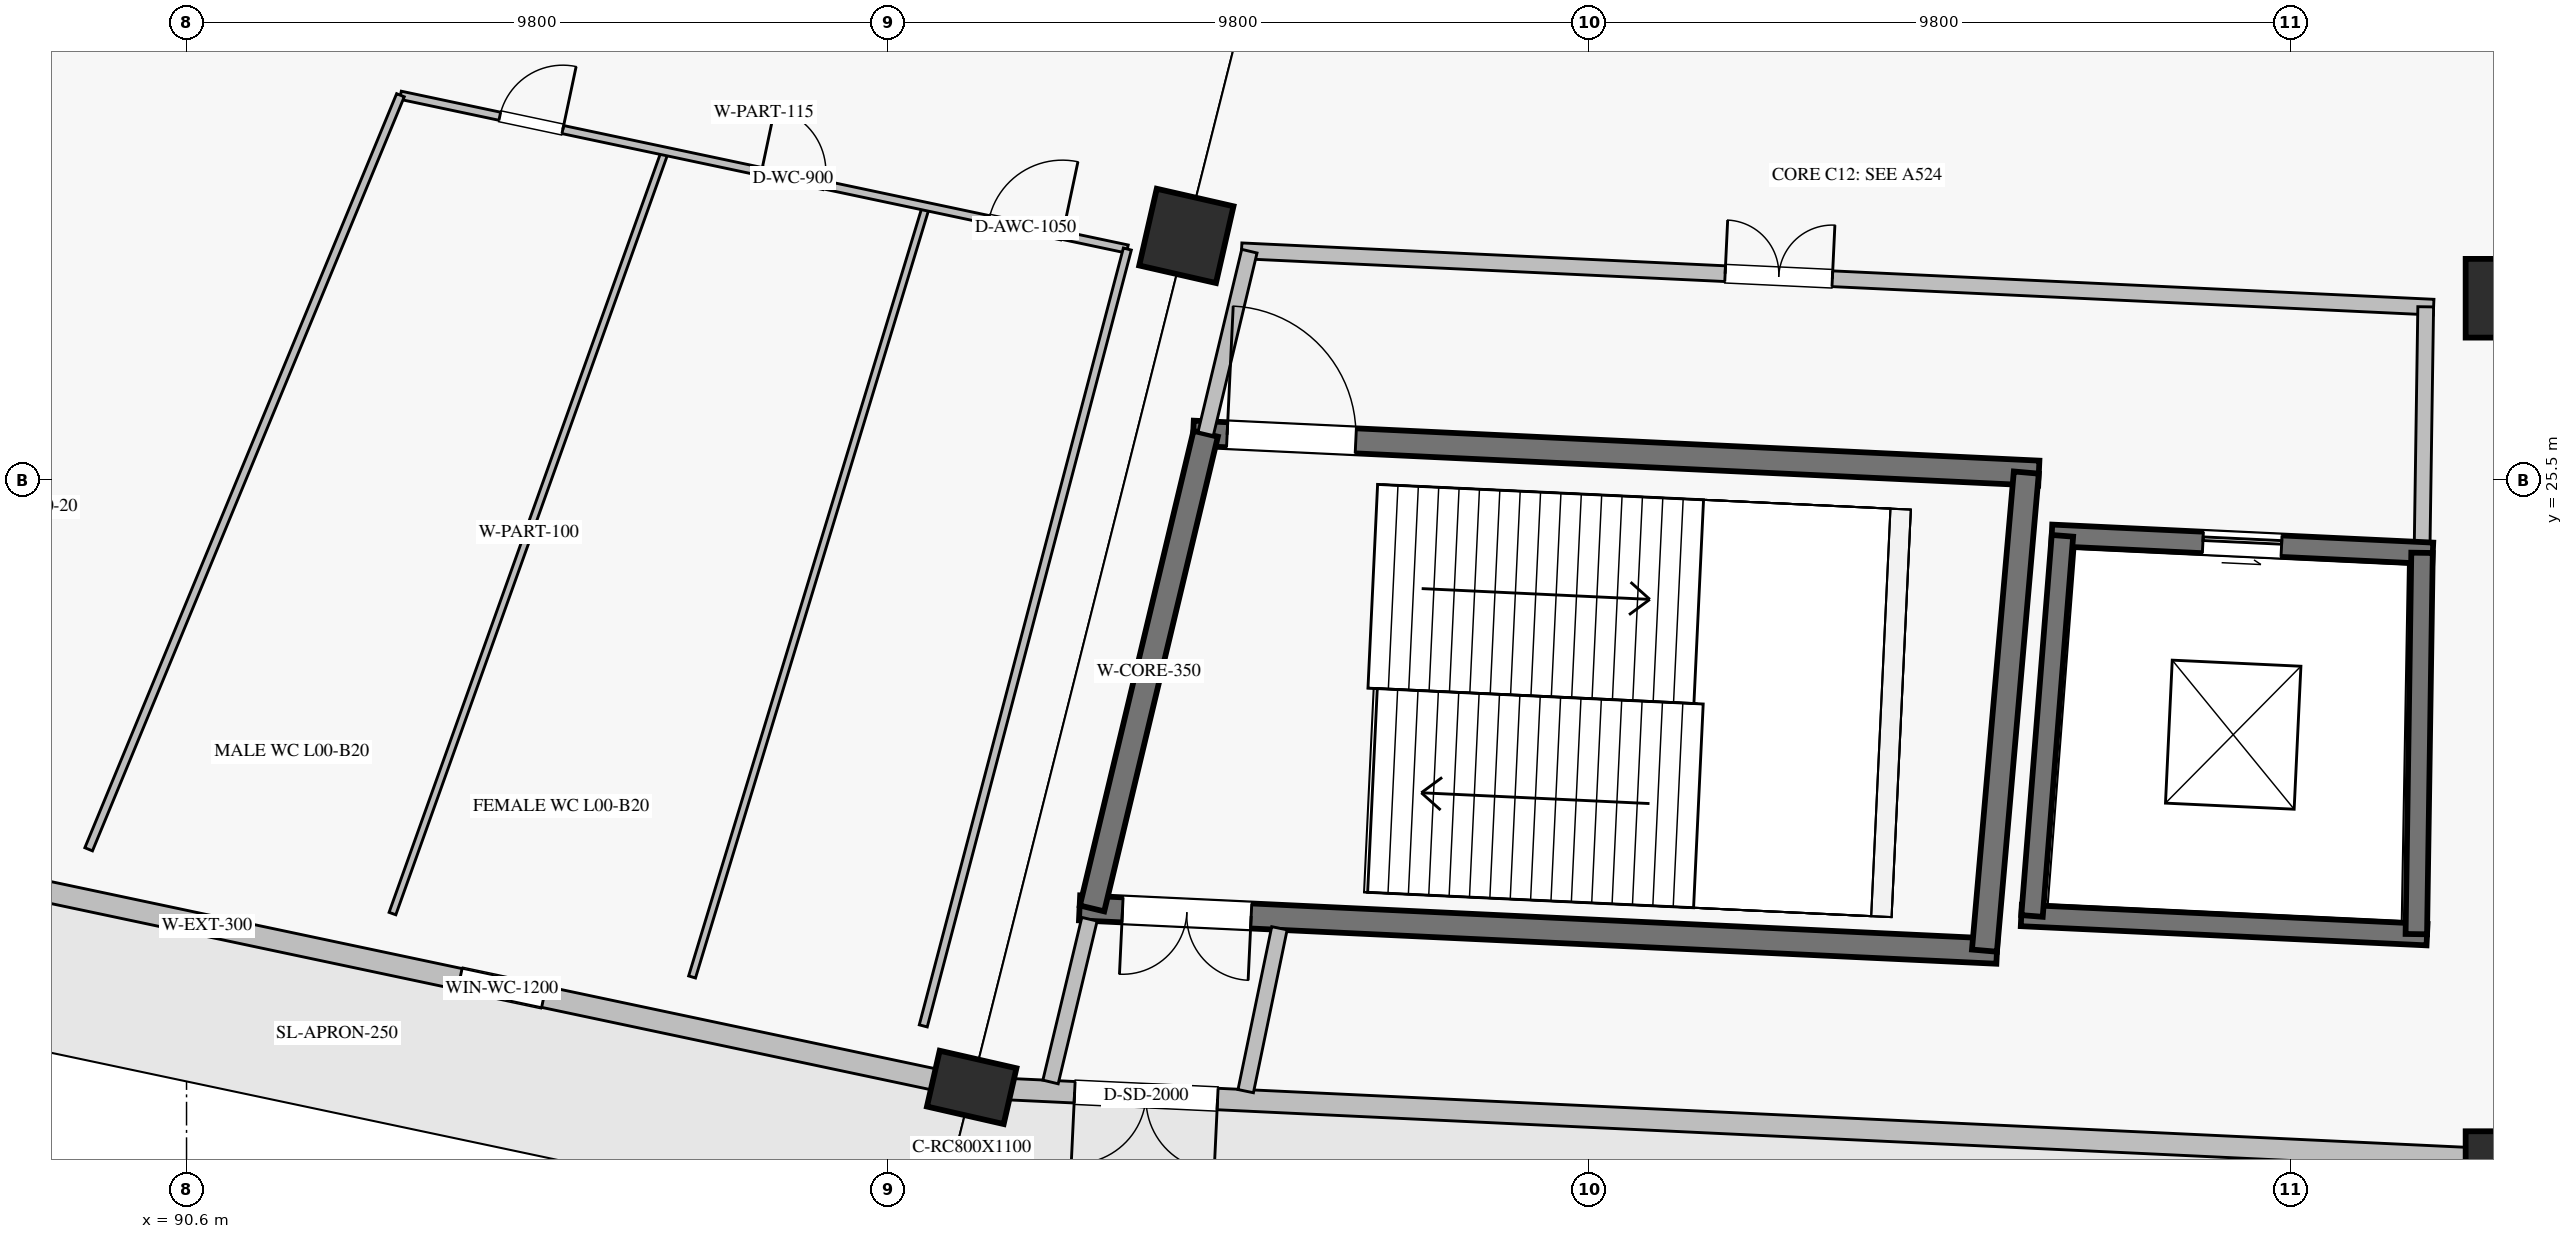
"""IFC4 building model, lengths in metres.
Left out: names, types, materials, properties, quantities, classifications, styles, units other than length and angle.
Written with IfcOpenShell. Run it as: python <this file> out.ifc"""

import sys

from ifc_helpers import new_model, si_unit, direction, frame, frame_2d, origin, origin_2d, place, context, subcontext, project, spatial, rectangle, extrude, element, fill, save


model = new_model("IFC4")
c1 = context("Model", 3, precision=1e-05, world=origin(), true_north=direction((0.0, 1.0)))
c2 = subcontext(c1, "Body", "Model", "MODEL_VIEW")
j1 = project(units=[si_unit("LENGTHUNIT", "METRE"), si_unit("PLANEANGLEUNIT", "RADIAN")], contexts=[c1])
p1 = place(None, origin())
s1 = spatial("IfcSite", under=j1, at=p1, CompositionType="ELEMENT")
p2 = place(p1, origin())
s2 = spatial("IfcBuilding", under=s1, at=p2, CompositionType="ELEMENT")
p3 = place(p2, origin())
s3 = spatial("IfcBuildingStorey", under=s2, at=p3, CompositionType="ELEMENT", Elevation=0.0)
for number, where, z_axis, x_axis in (
    (1, (104.572, 28.911, 0.0), (0.0, 0.0, 1.0), (-0.223, -0.975, 0.0)),
    (2, (123.0, 28.04, 0.0), (0.0, 0.0, 1.0), (0.0, -1.0, 0.0)),
):
    element("IfcColumn", number, at=place(p3, frame(where, z_axis=z_axis, x_axis=x_axis)), inside=s3, PredefinedType="COLUMN", context=c2, shape_type="SweptSolid", body=[
        extrude(rectangle(XDim=1.1, YDim=1.1, at=origin_2d()), origin(), (0.0, 0.0, 1.0), 5.78),
    ])
for number, where, z_axis, x_axis in (
    (3, (101.572, 17.013, 0.0), (0.0, 0.0, 1.0), (-0.223, -0.975, 0.0)),
    (4, (123.0, 16.0, 0.0), (0.0, 0.0, 1.0), (0.0, -1.0, 0.0)),
):
    element("IfcColumn", number, at=place(p3, frame(where, z_axis=z_axis, x_axis=x_axis)), inside=s3, PredefinedType="COLUMN", context=c2, shape_type="SweptSolid", body=[
        extrude(rectangle(XDim=0.8, YDim=1.1, at=origin_2d()), origin(), (0.0, 0.0, 1.0), 5.78),
    ])
p4 = place(p3, frame((80.577, 21.455, 0.0), z_axis=(0.0, 0.0, 1.0), x_axis=(0.978345100851, -0.206980346028, 0.0)))
e5 = element("IfcWall", 5, at=p4, inside=s3, PredefinedType="SOLIDWALL", context=c2, shape_type="SweptSolid", body=[
    extrude(rectangle(XDim=21.07, YDim=0.3, at=frame_2d((10.535, 0.0))), origin(), (0.0, 0.0, 1.0), 4.8),
])
p5 = place(p4, frame((2.493, 0.0, 0.0)))
e6 = element("IfcOpeningElement", 6, at=p5, cuts=e5, PredefinedType="OPENING", context=c2, shape_type="SweptSolid", body=[
    extrude(rectangle(XDim=2.6, YDim=2.4, at=frame_2d((1.3, 1.2))), frame((0.0, 0.16, 0.0), z_axis=(0.0, -1.0, 0.0), x_axis=(1.0, 0.0, 0.0)), (0.0, 0.0, 1.0), 0.32),
])
p6 = place(p4, frame((14.149, 0.0, 1.65)))
e7 = element("IfcOpeningElement", 7, at=p6, cuts=e5, PredefinedType="OPENING", context=c2, shape_type="SweptSolid", body=[
    extrude(rectangle(XDim=1.2, YDim=0.9, at=frame_2d((0.6, 0.45))), frame((0.0, 0.16, 0.0), z_axis=(0.0, -1.0, 0.0), x_axis=(1.0, 0.0, 0.0)), (0.0, 0.0, 1.0), 0.32),
])
p7 = place(p3, frame((101.962, 16.995, 0.0), z_axis=(0.0, 0.0, 1.0), x_axis=(0.998884033728, -0.047230150999, 0.0)))
e8 = element("IfcWall", 8, at=p7, inside=s3, PredefinedType="SOLIDWALL", context=c2, shape_type="SweptSolid", body=[
    extrude(rectangle(XDim=20.671, YDim=0.3, at=frame_2d((10.336, 0.0))), origin(), (0.0, 0.0, 1.0), 4.8),
])
p8 = place(p7, frame((1.05, 0.0, 0.0)))
e9 = element("IfcOpeningElement", 9, at=p8, cuts=e8, PredefinedType="OPENING", context=c2, shape_type="SweptSolid", body=[
    extrude(rectangle(XDim=2.0, YDim=2.3, at=frame_2d((1.0, 1.15))), frame((0.0, 0.16, 0.0), z_axis=(0.0, -1.0, 0.0), x_axis=(1.0, 0.0, 0.0)), (0.0, 0.0, 1.0), 0.32),
])
p9 = place(p3, frame((104.667, 26.155, 0.0), z_axis=(0.0, 0.0, 1.0), x_axis=(0.998883770468, -0.04723571843, 0.0)))
e10 = element("IfcWall", 10, at=p9, inside=s3, PredefinedType="SHEAR", context=c2, shape_type="SweptSolid", body=[
    extrude(rectangle(XDim=11.831, YDim=0.35, at=frame_2d((5.916, 0.0))), origin(), (0.0, 0.0, 1.0), 5.5),
])
p10 = place(p9, frame((0.475, 0.0, 0.0)))
e11 = element("IfcOpeningElement", 11, at=p10, cuts=e10, PredefinedType="OPENING", context=c2, shape_type="SweptSolid", body=[
    extrude(rectangle(XDim=1.8, YDim=2.2, at=frame_2d((0.9, 1.1))), frame((0.0, 0.185, 0.0), z_axis=(0.0, -1.0, 0.0), x_axis=(1.0, 0.0, 0.0)), (0.0, 0.0, 1.0), 0.37),
])
p11 = place(p3, frame((103.08, 19.522, 0.0), z_axis=(0.0, 0.0, 1.0), x_axis=(0.998884004857, -0.047230761603, 0.0)))
e12 = element("IfcWall", 12, at=p11, inside=s3, PredefinedType="SHEAR", context=c2, shape_type="SweptSolid", body=[
    extrude(rectangle(XDim=12.835, YDim=0.35, at=frame_2d((6.417, 0.0))), origin(), (0.0, 0.0, 1.0), 5.5),
])
p12 = place(p11, frame((0.601, 0.0, 0.0)))
e13 = element("IfcOpeningElement", 13, at=p12, cuts=e12, PredefinedType="OPENING", context=c2, shape_type="SweptSolid", body=[
    extrude(rectangle(XDim=1.8, YDim=2.2, at=frame_2d((0.9, 1.1))), frame((0.0, 0.185, 0.0), z_axis=(0.0, -1.0, 0.0), x_axis=(1.0, 0.0, 0.0)), (0.0, 0.0, 1.0), 0.37),
])
p13 = place(p3, frame((103.218, 19.363, 0.0), z_axis=(0.0, 0.0, 1.0), x_axis=(-0.232744981483, -0.972537800599, 0.0)))
e14 = element("IfcWall", 14, at=p13, inside=s3, PredefinedType="SOLIDWALL", context=c2, shape_type="SweptSolid", body=[
    extrude(rectangle(XDim=2.338, YDim=0.22, at=frame_2d((1.169, 0.0))), origin(), (0.0, 0.0, 1.0), 5.5),
])
p14 = place(p3, frame((105.873, 19.237, 0.0), z_axis=(0.0, 0.0, 1.0), x_axis=(-0.202636866681, -0.979253950853, 0.0)))
e15 = element("IfcWall", 15, at=p14, inside=s3, PredefinedType="SOLIDWALL", context=c2, shape_type="SweptSolid", body=[
    extrude(rectangle(XDim=2.324, YDim=0.22, at=frame_2d((1.162, 0.0))), origin(), (0.0, 0.0, 1.0), 5.5),
])
p15 = place(p3, frame((104.842, 26.146, 0.0), z_axis=(0.0, 0.0, 1.0), x_axis=(-0.232820532896, -0.972519716747, 0.0)))
e16 = element("IfcWall", 16, at=p15, inside=s3, PredefinedType="SHEAR", context=c2, shape_type="SweptSolid", body=[
    extrude(rectangle(XDim=6.82, YDim=0.35, at=frame_2d((3.41, 0.0))), origin(), (0.0, 0.0, 1.0), 5.5),
])
p16 = place(p3, frame((116.31, 25.604, 0.0), z_axis=(0.0, 0.0, 1.0), x_axis=(-0.087232889326, -0.996187945631, 0.0)))
e17 = element("IfcWall", 17, at=p16, inside=s3, PredefinedType="SHEAR", context=c2, shape_type="SweptSolid", body=[
    extrude(rectangle(XDim=6.706, YDim=0.35, at=frame_2d((3.353, 0.0))), origin(), (0.0, 0.0, 1.0), 5.5),
])
p17 = place(p3, frame((116.665, 24.728, 0.0), z_axis=(0.0, 0.0, 1.0), x_axis=(0.998882494219, -0.047262699282, 0.0)))
e18 = element("IfcWall", 18, at=p17, inside=s3, PredefinedType="SHEAR", context=c2, shape_type="SweptSolid", body=[
    extrude(rectangle(XDim=5.331, YDim=0.3, at=frame_2d((2.666, 0.0))), origin(), (0.0, 0.0, 1.0), 5.5),
])
p18 = place(p17, frame((2.115, 0.0, 0.0)))
e19 = element("IfcOpeningElement", 19, at=p18, cuts=e18, PredefinedType="OPENING", context=c2, shape_type="SweptSolid", body=[
    extrude(rectangle(XDim=1.1, YDim=2.2, at=frame_2d((0.55, 1.1))), frame((0.0, 0.16, 0.0), z_axis=(0.0, -1.0, 0.0), x_axis=(1.0, 0.0, 0.0)), (0.0, 0.0, 1.0), 0.32),
])
p19 = place(p3, frame((116.24, 19.416, 0.0), z_axis=(0.0, 0.0, 1.0), x_axis=(0.998884329444, -0.047223896393, 0.0)))
e20 = element("IfcWall", 20, at=p19, inside=s3, PredefinedType="SHEAR", context=c2, shape_type="SweptSolid", body=[
    extrude(rectangle(XDim=5.677, YDim=0.3, at=frame_2d((2.838, 0.0))), origin(), (0.0, 0.0, 1.0), 5.5),
])
p20 = place(p3, frame((116.815, 24.72, 0.0), z_axis=(0.0, 0.0, 1.0), x_axis=(-0.079807132276, -0.996810323802, 0.0)))
e21 = element("IfcWall", 21, at=p20, inside=s3, PredefinedType="SHEAR", context=c2, shape_type="SweptSolid", body=[
    extrude(rectangle(XDim=5.329, YDim=0.3, at=frame_2d((2.665, 0.0))), origin(), (0.0, 0.0, 1.0), 5.5),
])
p21 = place(p3, frame((121.84, 24.483, 0.0), z_axis=(0.0, 0.0, 1.0), x_axis=(-0.014935332807, -0.999888461697, 0.0)))
e22 = element("IfcWall", 22, at=p21, inside=s3, PredefinedType="SHEAR", context=c2, shape_type="SweptSolid", body=[
    extrude(rectangle(XDim=5.329, YDim=0.3, at=frame_2d((2.665, 0.0))), origin(), (0.0, 0.0, 1.0), 5.5),
])
p22 = place(p3, frame((105.343, 28.703, 0.0), z_axis=(0.0, 0.0, 1.0), x_axis=(0.998884242682, -0.047225731555, 0.0)))
e23 = element("IfcWall", 23, at=p22, inside=s3, PredefinedType="SOLIDWALL", context=c2, shape_type="SweptSolid", body=[
    extrude(rectangle(XDim=16.677, YDim=0.22, at=frame_2d((8.339, 0.0))), origin(), (0.0, 0.0, 1.0), 4.448),
])
p23 = place(p22, frame((6.766, 0.0, 0.0)))
e24 = element("IfcOpeningElement", 24, at=p23, cuts=e23, PredefinedType="OPENING", context=c2, shape_type="SweptSolid", body=[
    extrude(rectangle(XDim=1.5, YDim=2.2, at=frame_2d((0.75, 1.1))), frame((0.0, 0.12, 0.0), z_axis=(0.0, -1.0, 0.0), x_axis=(1.0, 0.0, 0.0)), (0.0, 0.0, 1.0), 0.24),
])
p24 = place(p3, frame((105.453, 28.698, 0.0), z_axis=(0.0, 0.0, 1.0), x_axis=(-0.232756927197, -0.972534941707, 0.0)))
e25 = element("IfcWall", 25, at=p24, inside=s3, PredefinedType="SOLIDWALL", context=c2, shape_type="SweptSolid", body=[
    extrude(rectangle(XDim=2.623, YDim=0.22, at=frame_2d((1.312, 0.0))), origin(), (0.0, 0.0, 1.0), 5.5),
])
p25 = place(p3, frame((121.892, 27.92, 0.0), z_axis=(0.0, 0.0, 1.0), x_axis=(-0.014984113027, -0.999887731876, 0.0)))
e26 = element("IfcWall", 26, at=p25, inside=s3, PredefinedType="SOLIDWALL", context=c2, shape_type="SweptSolid", body=[
    extrude(rectangle(XDim=3.438, YDim=0.22, at=frame_2d((1.719, 0.0))), origin(), (0.0, 0.0, 1.0), 5.5),
])
p26 = place(p3, frame((93.589, 30.877, 0.0), z_axis=(0.0, 0.0, 1.0), x_axis=(0.978349245343, -0.206960755065, 0.0)))
e27 = element("IfcWall", 27, at=p26, inside=s3, PredefinedType="PARTITIONING", context=c2, shape_type="SweptSolid", body=[
    extrude(rectangle(XDim=10.383, YDim=0.115, at=frame_2d((5.192, 0.0))), origin(), (0.0, 0.0, 1.0), 4.82),
])
p27 = place(p26, frame((1.419, 0.0, 0.0)))
e28 = element("IfcOpeningElement", 28, at=p27, cuts=e27, PredefinedType="OPENING", context=c2, shape_type="SweptSolid", body=[
    extrude(rectangle(XDim=0.9, YDim=2.1, at=frame_2d((0.45, 1.05))), frame((0.0, 0.067, 0.0), z_axis=(0.0, -1.0, 0.0), x_axis=(1.0, 0.0, 0.0)), (0.0, 0.0, 1.0), 0.135),
])
p28 = place(p26, frame((5.157, 0.0, 0.0)))
e29 = element("IfcOpeningElement", 29, at=p28, cuts=e27, PredefinedType="OPENING", context=c2, shape_type="SweptSolid", body=[
    extrude(rectangle(XDim=0.9, YDim=2.1, at=frame_2d((0.45, 1.05))), frame((0.0, 0.067, 0.0), z_axis=(0.0, -1.0, 0.0), x_axis=(1.0, 0.0, 0.0)), (0.0, 0.0, 1.0), 0.135),
])
p29 = place(p26, frame((8.405, 0.0, 0.0)))
e30 = element("IfcOpeningElement", 30, at=p29, cuts=e27, PredefinedType="OPENING", context=c2, shape_type="SweptSolid", body=[
    extrude(rectangle(XDim=1.05, YDim=2.1, at=frame_2d((0.525, 1.05))), frame((0.0, 0.067, 0.0), z_axis=(0.0, -1.0, 0.0), x_axis=(1.0, 0.0, 0.0)), (0.0, 0.0, 1.0), 0.135),
])
p30 = place(p3, frame((93.589, 30.877, 0.0), z_axis=(0.0, 0.0, 1.0), x_axis=(-0.382141857267, -0.924103674338, 0.0)))
e31 = element("IfcWall", 31, at=p30, inside=s3, PredefinedType="PARTITIONING", context=c2, shape_type="SweptSolid", body=[
    extrude(rectangle(XDim=11.402, YDim=0.115, at=frame_2d((5.701, 0.0))), origin(), (0.0, 0.0, 1.0), 4.82),
])
p31 = place(p3, frame((103.748, 28.728, 0.0), z_axis=(0.0, 0.0, 1.0), x_axis=(-0.254131382846, -0.967169706025, 0.0)))
e32 = element("IfcWall", 32, at=p31, inside=s3, PredefinedType="PARTITIONING", context=c2, shape_type="SweptSolid", body=[
    extrude(rectangle(XDim=11.224, YDim=0.115, at=frame_2d((5.612, 0.0))), origin(), (0.0, 0.0, 1.0), 4.82),
])
p32 = place(p3, frame((97.287, 30.094, 0.0), z_axis=(0.0, 0.0, 1.0), x_axis=(-0.336715047697, -0.941606593358, 0.0)))
e33 = element("IfcWall", 33, at=p32, inside=s3, PredefinedType="PARTITIONING", context=c2, shape_type="SweptSolid", body=[
    extrude(rectangle(XDim=11.313, YDim=0.1, at=frame_2d((5.657, 0.0))), origin(), (0.0, 0.0, 1.0), 4.82),
])
p33 = place(p3, frame((100.934, 29.323, 0.0), z_axis=(0.0, 0.0, 1.0), x_axis=(-0.290519206841, -0.956869160574, 0.0)))
e34 = element("IfcWall", 34, at=p33, inside=s3, PredefinedType="PARTITIONING", context=c2, shape_type="SweptSolid", body=[
    extrude(rectangle(XDim=11.252, YDim=0.1, at=frame_2d((5.626, 0.0))), origin(), (0.0, 0.0, 1.0), 4.82),
])
p34 = place(p6, origin())
e35 = element("IfcWindow", 35, at=p34, inside=s3, PartitioningType="SINGLE_PANEL", PredefinedType="WINDOW", context=c2, shape_type="SweptSolid", body=[
    extrude(rectangle(XDim=1.2, YDim=0.9, at=frame_2d((0.6, 0.45))), frame((0.0, 0.03, 0.0), z_axis=(0.0, -1.0, 0.0), x_axis=(1.0, 0.0, 0.0)), (0.0, 0.0, 1.0), 0.06),
])
fill(e7, e35)
p35 = place(p8, frame((2.0, 0.0, 0.0), z_axis=(0.0, 0.0, 1.0), x_axis=(-1.0, 0.0, 0.0)))
e36 = element("IfcDoor", 36, at=p35, inside=s3, OperationType="DOUBLE_DOOR_SINGLE_SWING", PredefinedType="DOOR", context=c2, shape_type="SweptSolid", body=[
    extrude(rectangle(XDim=2.0, YDim=2.3, at=frame_2d((1.0, 1.15))), frame((0.0, 0.025, 0.0), z_axis=(0.0, -1.0, 0.0), x_axis=(1.0, 0.0, 0.0)), (0.0, 0.0, 1.0), 0.05),
])
fill(e9, e36)
p36 = place(p12, frame((1.8, 0.0, 0.0), z_axis=(0.0, 0.0, 1.0), x_axis=(-1.0, 0.0, 0.0)))
e37 = element("IfcDoor", 37, at=p36, inside=s3, OperationType="DOUBLE_DOOR_SINGLE_SWING", PredefinedType="DOOR", context=c2, shape_type="SweptSolid", body=[
    extrude(rectangle(XDim=1.8, YDim=2.2, at=frame_2d((0.9, 1.1))), frame((0.0, 0.025, 0.0), z_axis=(0.0, -1.0, 0.0), x_axis=(1.0, 0.0, 0.0)), (0.0, 0.0, 1.0), 0.05),
])
fill(e13, e37)
p37 = place(p10, origin())
e38 = element("IfcDoor", 38, at=p37, inside=s3, OperationType="SINGLE_SWING_LEFT", PredefinedType="DOOR", context=c2, shape_type="SweptSolid", body=[
    extrude(rectangle(XDim=1.8, YDim=2.2, at=frame_2d((0.9, 1.1))), frame((0.0, 0.025, 0.0), z_axis=(0.0, -1.0, 0.0), x_axis=(1.0, 0.0, 0.0)), (0.0, 0.0, 1.0), 0.05),
])
fill(e11, e38)
p38 = place(p18, origin())
e39 = element("IfcDoor", 39, at=p38, inside=s3, OperationType="SLIDING_TO_RIGHT", PredefinedType="DOOR", context=c2, shape_type="SweptSolid", body=[
    extrude(rectangle(XDim=1.1, YDim=2.2, at=frame_2d((0.55, 1.1))), frame((0.0, 0.025, 0.0), z_axis=(0.0, -1.0, 0.0), x_axis=(1.0, 0.0, 0.0)), (0.0, 0.0, 1.0), 0.05),
])
fill(e19, e39)
p39 = place(p23, origin())
e40 = element("IfcDoor", 40, at=p39, inside=s3, OperationType="DOUBLE_DOOR_SINGLE_SWING", PredefinedType="DOOR", context=c2, shape_type="SweptSolid", body=[
    extrude(rectangle(XDim=1.5, YDim=2.2, at=frame_2d((0.75, 1.1))), frame((0.0, 0.025, 0.0), z_axis=(0.0, -1.0, 0.0), x_axis=(1.0, 0.0, 0.0)), (0.0, 0.0, 1.0), 0.05),
])
fill(e24, e40)
p40 = place(p27, origin())
e41 = element("IfcDoor", 41, at=p40, inside=s3, OperationType="SINGLE_SWING_RIGHT", PredefinedType="DOOR", context=c2, shape_type="SweptSolid", body=[
    extrude(rectangle(XDim=0.9, YDim=2.1, at=frame_2d((0.45, 1.05))), frame((0.0, 0.025, 0.0), z_axis=(0.0, -1.0, 0.0), x_axis=(1.0, 0.0, 0.0)), (0.0, 0.0, 1.0), 0.05),
])
fill(e28, e41)
p41 = place(p28, origin())
e42 = element("IfcDoor", 42, at=p41, inside=s3, OperationType="SINGLE_SWING_LEFT", PredefinedType="DOOR", context=c2, shape_type="SweptSolid", body=[
    extrude(rectangle(XDim=0.9, YDim=2.1, at=frame_2d((0.45, 1.05))), frame((0.0, 0.025, 0.0), z_axis=(0.0, -1.0, 0.0), x_axis=(1.0, 0.0, 0.0)), (0.0, 0.0, 1.0), 0.05),
])
fill(e29, e42)
p42 = place(p29, origin())
e43 = element("IfcDoor", 43, at=p42, inside=s3, OperationType="SINGLE_SWING_RIGHT", PredefinedType="DOOR", context=c2, shape_type="SweptSolid", body=[
    extrude(rectangle(XDim=1.05, YDim=2.1, at=frame_2d((0.525, 1.05))), frame((0.0, 0.025, 0.0), z_axis=(0.0, -1.0, 0.0), x_axis=(1.0, 0.0, 0.0)), (0.0, 0.0, 1.0), 0.05),
])
fill(e30, e43)
save(model, sys.argv[1])
